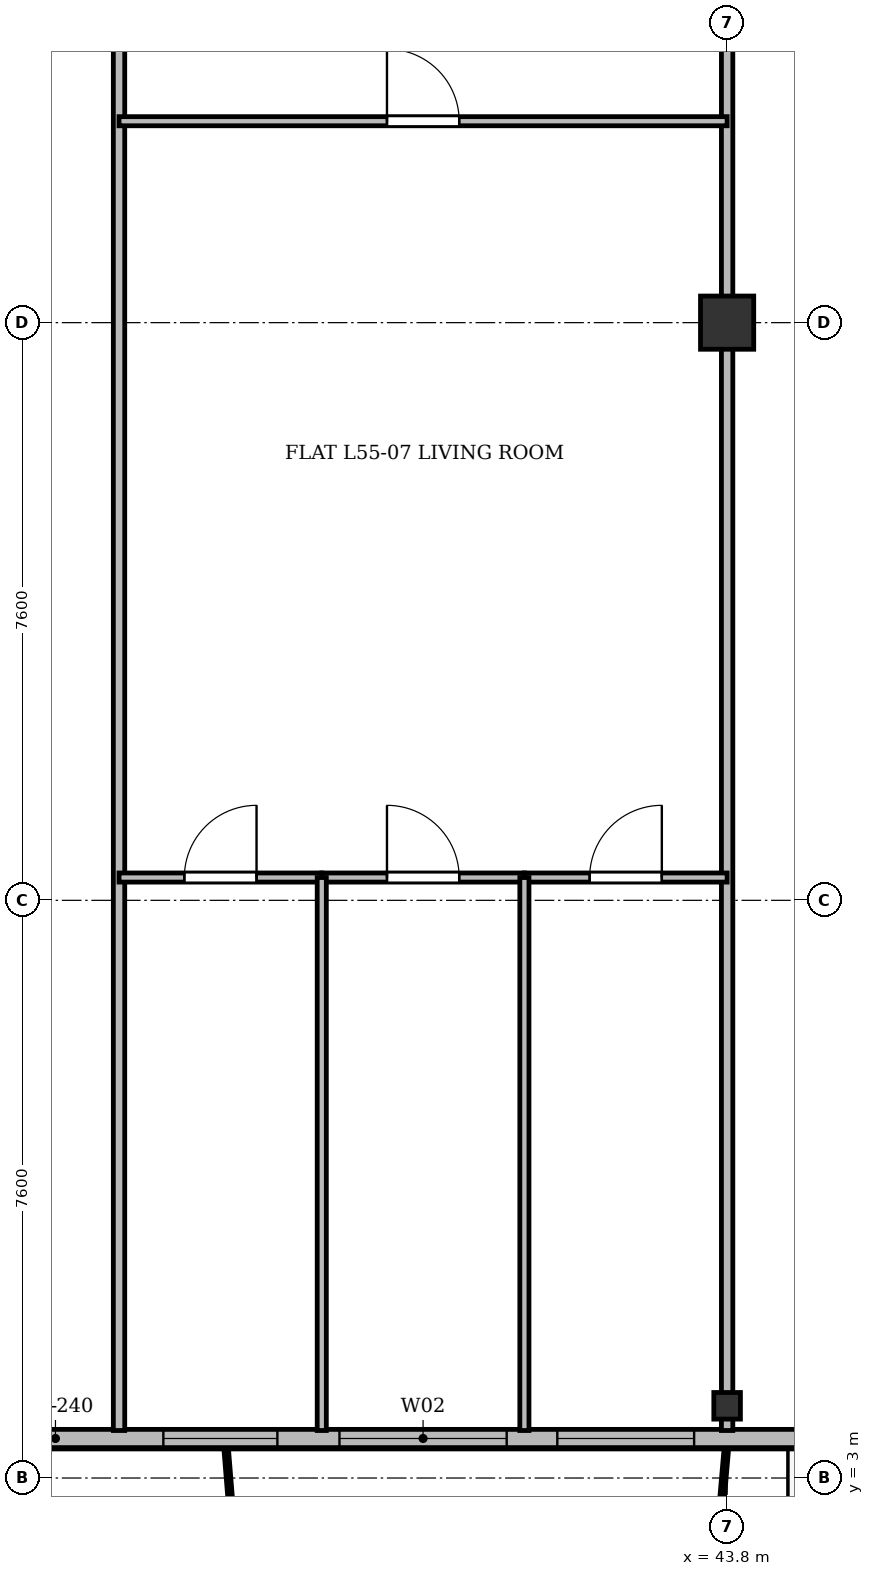
"""IFC4 building model, lengths in metres.
Left out: names, types, materials, properties, quantities, classifications, styles, units other than length and angle.
Written with IfcOpenShell. Run it as: python <this file> out.ifc"""

import sys

from ifc_helpers import new_model, si_unit, direction, frame, frame_2d, origin, origin_2d, place, context, subcontext, project, spatial, rectangle, i_section, extrude, source, transform, mapped, element, fill, save


model = new_model("IFC4")
c1 = context("Model", 3, precision=1e-05, world=origin(), true_north=direction((0.0, 1.0)))
c2 = subcontext(c1, "Body", "Model", "MODEL_VIEW")
j1 = project(units=[si_unit("LENGTHUNIT", "METRE"), si_unit("PLANEANGLEUNIT", "RADIAN")], contexts=[c1])
p1 = place(None, origin())
s1 = spatial("IfcSite", under=j1, at=p1, CompositionType="ELEMENT")
p2 = place(p1, origin())
s2 = spatial("IfcBuilding", under=s1, at=p2, CompositionType="ELEMENT")
p3 = place(p2, frame((0.0, 0.0, 212.1)))
s3 = spatial("IfcBuildingStorey", under=s2, at=p3, CompositionType="ELEMENT", Elevation=212.1)
m1 = source(origin(), c2, "Body", "SweptSolid", [
    extrude(i_section(OverallWidth=0.35, OverallDepth=0.35, WebThickness=0.018, FlangeThickness=0.028, at=origin_2d()), origin(), (0.0, 0.0, 1.0), 3.6),
])
p4 = place(p3, frame((43.8, 3.95, 0.0), z_axis=(0.0, 0.0, 1.0), x_axis=(1.0, 0.0, 0.0)))
e1 = element("IfcColumn", 1, at=p4, inside=s3, PredefinedType="COLUMN", context=c2, shape_type="MappedRepresentation", body=[
    mapped(m1, transform((0.0, 0.0, 0.0), x_axis=(1.0, 0.0, 0.0), y_axis=(0.0, 1.0, 0.0), z_axis=(0.0, 0.0, 1.0), scale=1.0)),
])
m2 = source(origin(), c2, "Body", "SweptSolid", [
    extrude(rectangle(XDim=0.7, YDim=0.7, at=origin_2d()), origin(), (0.0, 0.0, 1.0), 3.6),
])
p5 = place(p3, frame((43.8, 18.2, 0.0), z_axis=(0.0, 0.0, 1.0), x_axis=(1.0, 0.0, 0.0)))
e2 = element("IfcColumn", 2, at=p5, inside=s3, PredefinedType="COLUMN", context=c2, shape_type="MappedRepresentation", body=[
    mapped(m2, transform((0.0, 0.0, 0.0), x_axis=(1.0, 0.0, 0.0), y_axis=(0.0, 1.0, 0.0), z_axis=(0.0, 0.0, 1.0), scale=1.0)),
])
p6 = place(p3, frame((63.4, 3.52, 0.0), z_axis=(0.0, 0.0, 1.0), x_axis=(-1.0, 0.0, 0.0)))
e3 = element("IfcWall", 3, at=p6, inside=s3, PredefinedType="SOLIDWALL", context=c2, shape_type="SweptSolid", body=[
    extrude(rectangle(XDim=52.4, YDim=0.24, at=frame_2d((26.2, 0.0))), origin(), (0.0, 0.0, 1.0), 3.36),
])
p7 = place(p6, frame((1.445, 0.0, 0.9)))
e4 = element("IfcOpeningElement", 4, at=p7, cuts=e3, PredefinedType="OPENING", context=c2, shape_type="SweptSolid", body=[
    extrude(rectangle(XDim=1.8, YDim=1.8, at=frame_2d((0.9, 0.9))), frame((0.0, 0.13, 0.0), z_axis=(0.0, -1.0, 0.0), x_axis=(1.0, 0.0, 0.0)), (0.0, 0.0, 1.0), 0.26),
])
p8 = place(p6, frame((5.15, 0.0, 0.9)))
e5 = element("IfcOpeningElement", 5, at=p8, cuts=e3, PredefinedType="OPENING", context=c2, shape_type="SweptSolid", body=[
    extrude(rectangle(XDim=1.5, YDim=1.75, at=frame_2d((0.75, 0.875))), frame((0.0, 0.13, 0.0), z_axis=(0.0, -1.0, 0.0), x_axis=(1.0, 0.0, 0.0)), (0.0, 0.0, 1.0), 0.26),
])
p9 = place(p6, frame((7.45, 0.0, 0.9)))
e6 = element("IfcOpeningElement", 6, at=p9, cuts=e3, PredefinedType="OPENING", context=c2, shape_type="SweptSolid", body=[
    extrude(rectangle(XDim=1.5, YDim=1.75, at=frame_2d((0.75, 0.875))), frame((0.0, 0.13, 0.0), z_axis=(0.0, -1.0, 0.0), x_axis=(1.0, 0.0, 0.0)), (0.0, 0.0, 1.0), 0.26),
])
p10 = place(p6, frame((9.8, 0.0, 0.9)))
e7 = element("IfcOpeningElement", 7, at=p10, cuts=e3, PredefinedType="OPENING", context=c2, shape_type="SweptSolid", body=[
    extrude(rectangle(XDim=2.0, YDim=1.95, at=frame_2d((1.0, 0.975))), frame((0.0, 0.13, 0.0), z_axis=(0.0, -1.0, 0.0), x_axis=(1.0, 0.0, 0.0)), (0.0, 0.0, 1.0), 0.26),
])
p11 = place(p6, frame((14.217, 0.0, 0.0)))
e8 = element("IfcOpeningElement", 8, at=p11, cuts=e3, PredefinedType="OPENING", context=c2, shape_type="SweptSolid", body=[
    extrude(rectangle(XDim=1.2, YDim=2.2, at=frame_2d((0.6, 1.1))), frame((0.0, 0.13, 0.0), z_axis=(0.0, -1.0, 0.0), x_axis=(1.0, 0.0, 0.0)), (0.0, 0.0, 1.0), 0.26),
])
p12 = place(p6, frame((20.034, 0.0, 0.9)))
e9 = element("IfcOpeningElement", 9, at=p12, cuts=e3, PredefinedType="OPENING", context=c2, shape_type="SweptSolid", body=[
    extrude(rectangle(XDim=1.8, YDim=1.8, at=frame_2d((0.9, 0.9))), frame((0.0, 0.13, 0.0), z_axis=(0.0, -1.0, 0.0), x_axis=(1.0, 0.0, 0.0)), (0.0, 0.0, 1.0), 0.26),
])
p13 = place(p6, frame((22.5, 0.0, 0.9)))
e10 = element("IfcOpeningElement", 10, at=p13, cuts=e3, PredefinedType="OPENING", context=c2, shape_type="SweptSolid", body=[
    extrude(rectangle(XDim=2.2, YDim=1.8, at=frame_2d((1.1, 0.9))), frame((0.0, 0.13, 0.0), z_axis=(0.0, -1.0, 0.0), x_axis=(1.0, 0.0, 0.0)), (0.0, 0.0, 1.0), 0.26),
])
p14 = place(p6, frame((25.517, 0.0, 0.9)))
e11 = element("IfcOpeningElement", 11, at=p14, cuts=e3, PredefinedType="OPENING", context=c2, shape_type="SweptSolid", body=[
    extrude(rectangle(XDim=1.5, YDim=1.75, at=frame_2d((0.75, 0.875))), frame((0.0, 0.13, 0.0), z_axis=(0.0, -1.0, 0.0), x_axis=(1.0, 0.0, 0.0)), (0.0, 0.0, 1.0), 0.26),
])
p15 = place(p6, frame((29.2, 0.0, 0.9)))
e12 = element("IfcOpeningElement", 12, at=p15, cuts=e3, PredefinedType="OPENING", context=c2, shape_type="SweptSolid", body=[
    extrude(rectangle(XDim=2.0, YDim=1.95, at=frame_2d((1.0, 0.975))), frame((0.0, 0.13, 0.0), z_axis=(0.0, -1.0, 0.0), x_axis=(1.0, 0.0, 0.0)), (0.0, 0.0, 1.0), 0.26),
])
p16 = place(p6, frame((33.175, 0.0, 0.9)))
e13 = element("IfcOpeningElement", 13, at=p16, cuts=e3, PredefinedType="OPENING", context=c2, shape_type="SweptSolid", body=[
    extrude(rectangle(XDim=1.65, YDim=1.85, at=frame_2d((0.825, 0.925))), frame((0.0, 0.13, 0.0), z_axis=(0.0, -1.0, 0.0), x_axis=(1.0, 0.0, 0.0)), (0.0, 0.0, 1.0), 0.26),
])
p17 = place(p6, frame((35.5, 0.0, 0.9)))
e14 = element("IfcOpeningElement", 14, at=p17, cuts=e3, PredefinedType="OPENING", context=c2, shape_type="SweptSolid", body=[
    extrude(rectangle(XDim=1.8, YDim=1.8, at=frame_2d((0.9, 0.9))), frame((0.0, 0.13, 0.0), z_axis=(0.0, -1.0, 0.0), x_axis=(1.0, 0.0, 0.0)), (0.0, 0.0, 1.0), 0.26),
])
p18 = place(p6, frame((38.05, 0.0, 0.9)))
e15 = element("IfcOpeningElement", 15, at=p18, cuts=e3, PredefinedType="OPENING", context=c2, shape_type="SweptSolid", body=[
    extrude(rectangle(XDim=1.5, YDim=1.75, at=frame_2d((0.75, 0.875))), frame((0.0, 0.13, 0.0), z_axis=(0.0, -1.0, 0.0), x_axis=(1.0, 0.0, 0.0)), (0.0, 0.0, 1.0), 0.26),
])
p19 = place(p6, frame((41.456, 0.0, 0.0)))
e16 = element("IfcOpeningElement", 16, at=p19, cuts=e3, PredefinedType="OPENING", context=c2, shape_type="SweptSolid", body=[
    extrude(rectangle(XDim=1.2, YDim=2.2, at=frame_2d((0.6, 1.1))), frame((0.0, 0.13, 0.0), z_axis=(0.0, -1.0, 0.0), x_axis=(1.0, 0.0, 0.0)), (0.0, 0.0, 1.0), 0.26),
])
p20 = place(p6, frame((43.45, 0.0, 0.9)))
e17 = element("IfcOpeningElement", 17, at=p20, cuts=e3, PredefinedType="OPENING", context=c2, shape_type="SweptSolid", body=[
    extrude(rectangle(XDim=1.5, YDim=1.75, at=frame_2d((0.75, 0.875))), frame((0.0, 0.13, 0.0), z_axis=(0.0, -1.0, 0.0), x_axis=(1.0, 0.0, 0.0)), (0.0, 0.0, 1.0), 0.26),
])
p21 = place(p6, frame((45.675, 0.0, 0.9)))
e18 = element("IfcOpeningElement", 18, at=p21, cuts=e3, PredefinedType="OPENING", context=c2, shape_type="SweptSolid", body=[
    extrude(rectangle(XDim=1.65, YDim=1.85, at=frame_2d((0.825, 0.925))), frame((0.0, 0.13, 0.0), z_axis=(0.0, -1.0, 0.0), x_axis=(1.0, 0.0, 0.0)), (0.0, 0.0, 1.0), 0.26),
])
p22 = place(p6, frame((49.155, 0.0, 0.9)))
e19 = element("IfcOpeningElement", 19, at=p22, cuts=e3, PredefinedType="OPENING", context=c2, shape_type="SweptSolid", body=[
    extrude(rectangle(XDim=1.8, YDim=1.8, at=frame_2d((0.9, 0.9))), frame((0.0, 0.13, 0.0), z_axis=(0.0, -1.0, 0.0), x_axis=(1.0, 0.0, 0.0)), (0.0, 0.0, 1.0), 0.26),
])
p23 = place(p3, frame((35.8, 3.625, 0.0), z_axis=(0.0, 0.0, 1.0), x_axis=(0.0, 1.0, 0.0)))
e20 = element("IfcWall", 20, at=p23, inside=s3, PredefinedType="PARTITIONING", context=c2, shape_type="SweptSolid", body=[
    extrude(rectangle(XDim=27.175, YDim=0.15, at=frame_2d((13.587, 0.0))), origin(), (0.0, 0.0, 1.0), 2.91),
])
p24 = place(p3, frame((43.8, 3.625, 0.0), z_axis=(0.0, 0.0, 1.0), x_axis=(0.0, 1.0, 0.0)))
e21 = element("IfcWall", 21, at=p24, inside=s3, PredefinedType="PARTITIONING", context=c2, shape_type="SweptSolid", body=[
    extrude(rectangle(XDim=27.175, YDim=0.15, at=frame_2d((13.587, 0.0))), origin(), (0.0, 0.0, 1.0), 2.86),
])
p25 = place(p3, frame((35.8, 20.85, 0.0), z_axis=(0.0, 0.0, 1.0), x_axis=(1.0, 0.0, 0.0)))
e22 = element("IfcWall", 22, at=p25, inside=s3, PredefinedType="PARTITIONING", context=c2, shape_type="SweptSolid", body=[
    extrude(rectangle(XDim=8.0, YDim=0.12, at=frame_2d((4.0, 0.0))), origin(), (0.0, 0.0, 1.0), 2.86),
])
p26 = place(p25, frame((3.525, 0.0, 0.0)))
e23 = element("IfcOpeningElement", 23, at=p26, cuts=e22, PredefinedType="OPENING", context=c2, shape_type="SweptSolid", body=[
    extrude(rectangle(XDim=0.95, YDim=2.15, at=frame_2d((0.475, 1.075))), frame((0.0, 0.07, 0.0), z_axis=(0.0, -1.0, 0.0), x_axis=(1.0, 0.0, 0.0)), (0.0, 0.0, 1.0), 0.14),
])
p27 = place(p3, frame((35.8, 10.9, 0.0), z_axis=(0.0, 0.0, 1.0), x_axis=(1.0, 0.0, 0.0)))
e24 = element("IfcWall", 24, at=p27, inside=s3, PredefinedType="PARTITIONING", context=c2, shape_type="SweptSolid", body=[
    extrude(rectangle(XDim=2.667, YDim=0.12, at=frame_2d((1.333, 0.0))), origin(), (0.0, 0.0, 1.0), 3.36),
])
p28 = place(p27, frame((0.859, 0.0, 0.0)))
e25 = element("IfcOpeningElement", 25, at=p28, cuts=e24, PredefinedType="OPENING", context=c2, shape_type="SweptSolid", body=[
    extrude(rectangle(XDim=0.95, YDim=2.15, at=frame_2d((0.475, 1.075))), frame((0.0, 0.07, 0.0), z_axis=(0.0, -1.0, 0.0), x_axis=(1.0, 0.0, 0.0)), (0.0, 0.0, 1.0), 0.14),
])
p29 = place(p3, frame((38.467, 10.9, 0.0), z_axis=(0.0, 0.0, 1.0), x_axis=(1.0, 0.0, 0.0)))
e26 = element("IfcWall", 26, at=p29, inside=s3, PredefinedType="PARTITIONING", context=c2, shape_type="SweptSolid", body=[
    extrude(rectangle(XDim=2.666, YDim=0.12, at=frame_2d((1.333, 0.0))), origin(), (0.0, 0.0, 1.0), 3.36),
])
p30 = place(p29, frame((0.858, 0.0, 0.0)))
e27 = element("IfcOpeningElement", 27, at=p30, cuts=e26, PredefinedType="OPENING", context=c2, shape_type="SweptSolid", body=[
    extrude(rectangle(XDim=0.95, YDim=2.15, at=frame_2d((0.475, 1.075))), frame((0.0, 0.07, 0.0), z_axis=(0.0, -1.0, 0.0), x_axis=(1.0, 0.0, 0.0)), (0.0, 0.0, 1.0), 0.14),
])
p31 = place(p3, frame((38.467, 3.625, 0.0), z_axis=(0.0, 0.0, 1.0), x_axis=(0.0, 1.0, 0.0)))
e28 = element("IfcWall", 28, at=p31, inside=s3, PredefinedType="PARTITIONING", context=c2, shape_type="SweptSolid", body=[
    extrude(rectangle(XDim=7.275, YDim=0.12, at=frame_2d((3.637, 0.0))), origin(), (0.0, 0.0, 1.0), 2.91),
])
p32 = place(p3, frame((41.133, 10.9, 0.0), z_axis=(0.0, 0.0, 1.0), x_axis=(1.0, 0.0, 0.0)))
e29 = element("IfcWall", 29, at=p32, inside=s3, PredefinedType="PARTITIONING", context=c2, shape_type="SweptSolid", body=[
    extrude(rectangle(XDim=2.667, YDim=0.12, at=frame_2d((1.333, 0.0))), origin(), (0.0, 0.0, 1.0), 2.86),
])
p33 = place(p32, frame((0.858, 0.0, 0.0)))
e30 = element("IfcOpeningElement", 30, at=p33, cuts=e29, PredefinedType="OPENING", context=c2, shape_type="SweptSolid", body=[
    extrude(rectangle(XDim=0.95, YDim=2.15, at=frame_2d((0.475, 1.075))), frame((0.0, 0.07, 0.0), z_axis=(0.0, -1.0, 0.0), x_axis=(1.0, 0.0, 0.0)), (0.0, 0.0, 1.0), 0.14),
])
p34 = place(p3, frame((41.133, 3.625, 0.0), z_axis=(0.0, 0.0, 1.0), x_axis=(0.0, 1.0, 0.0)))
e31 = element("IfcWall", 31, at=p34, inside=s3, PredefinedType="PARTITIONING", context=c2, shape_type="SweptSolid", body=[
    extrude(rectangle(XDim=7.275, YDim=0.12, at=frame_2d((3.637, 0.0))), origin(), (0.0, 0.0, 1.0), 2.91),
])
m3 = source(origin(), c2, "Body", "SweptSolid", [
    extrude(rectangle(XDim=1.8, YDim=1.8, at=frame_2d((0.9, 0.9))), frame((0.0, 0.03, 0.0), z_axis=(0.0, -1.0, 0.0), x_axis=(1.0, 0.0, 0.0)), (0.0, 0.0, 1.0), 0.06),
])
p35 = place(p12, origin())
e32 = element("IfcWindow", 32, at=p35, inside=s3, PartitioningType="SINGLE_PANEL", PredefinedType="WINDOW", context=c2, shape_type="MappedRepresentation", body=[
    mapped(m3, transform((0.0, 0.0, 0.0), x_axis=(1.0, 0.0, 0.0), y_axis=(0.0, 1.0, 0.0), z_axis=(0.0, 0.0, 1.0), scale=1.0)),
])
fill(e9, e32)
m4 = source(origin(), c2, "Body", "SweptSolid", [
    extrude(rectangle(XDim=2.2, YDim=1.8, at=frame_2d((1.1, 0.9))), frame((0.0, 0.03, 0.0), z_axis=(0.0, -1.0, 0.0), x_axis=(1.0, 0.0, 0.0)), (0.0, 0.0, 1.0), 0.06),
])
p36 = place(p13, origin())
e33 = element("IfcWindow", 33, at=p36, inside=s3, PartitioningType="SINGLE_PANEL", PredefinedType="WINDOW", context=c2, shape_type="MappedRepresentation", body=[
    mapped(m4, transform((0.0, 0.0, 0.0), x_axis=(1.0, 0.0, 0.0), y_axis=(0.0, 1.0, 0.0), z_axis=(0.0, 0.0, 1.0), scale=1.0)),
])
fill(e10, e33)
m5 = source(origin(), c2, "Body", "SweptSolid", [
    extrude(rectangle(XDim=1.5, YDim=1.75, at=frame_2d((0.75, 0.875))), frame((0.0, 0.03, 0.0), z_axis=(0.0, -1.0, 0.0), x_axis=(1.0, 0.0, 0.0)), (0.0, 0.0, 1.0), 0.06),
])
p37 = place(p14, origin())
e34 = element("IfcWindow", 34, at=p37, inside=s3, PartitioningType="SINGLE_PANEL", PredefinedType="WINDOW", context=c2, shape_type="MappedRepresentation", body=[
    mapped(m5, transform((0.0, 0.0, 0.0), x_axis=(1.0, 0.0, 0.0), y_axis=(0.0, 1.0, 0.0), z_axis=(0.0, 0.0, 1.0), scale=1.0)),
])
fill(e11, e34)
m6 = source(origin(), c2, "Body", "SweptSolid", [
    extrude(rectangle(XDim=0.95, YDim=2.15, at=frame_2d((0.475, 1.075))), frame((0.0, 0.025, 0.0), z_axis=(0.0, -1.0, 0.0), x_axis=(1.0, 0.0, 0.0)), (0.0, 0.0, 1.0), 0.05),
])
p38 = place(p26, origin())
e35 = element("IfcDoor", 35, at=p38, inside=s3, OperationType="SINGLE_SWING_LEFT", PredefinedType="DOOR", context=c2, shape_type="MappedRepresentation", body=[
    mapped(m6, transform((0.0, 0.0, 0.0), x_axis=(1.0, 0.0, 0.0), y_axis=(0.0, 1.0, 0.0), z_axis=(0.0, 0.0, 1.0), scale=1.0)),
])
fill(e23, e35)
p39 = place(p28, origin())
e36 = element("IfcDoor", 36, at=p39, inside=s3, OperationType="SINGLE_SWING_RIGHT", PredefinedType="DOOR", context=c2, shape_type="MappedRepresentation", body=[
    mapped(m6, transform((0.0, 0.0, 0.0), x_axis=(1.0, 0.0, 0.0), y_axis=(0.0, 1.0, 0.0), z_axis=(0.0, 0.0, 1.0), scale=1.0)),
])
fill(e25, e36)
p40 = place(p30, origin())
e37 = element("IfcDoor", 37, at=p40, inside=s3, OperationType="SINGLE_SWING_LEFT", PredefinedType="DOOR", context=c2, shape_type="MappedRepresentation", body=[
    mapped(m6, transform((0.0, 0.0, 0.0), x_axis=(1.0, 0.0, 0.0), y_axis=(0.0, 1.0, 0.0), z_axis=(0.0, 0.0, 1.0), scale=1.0)),
])
fill(e27, e37)
p41 = place(p33, origin())
e38 = element("IfcDoor", 38, at=p41, inside=s3, OperationType="SINGLE_SWING_RIGHT", PredefinedType="DOOR", context=c2, shape_type="MappedRepresentation", body=[
    mapped(m6, transform((0.0, 0.0, 0.0), x_axis=(1.0, 0.0, 0.0), y_axis=(0.0, 1.0, 0.0), z_axis=(0.0, 0.0, 1.0), scale=1.0)),
])
fill(e30, e38)
save(model, sys.argv[1])
